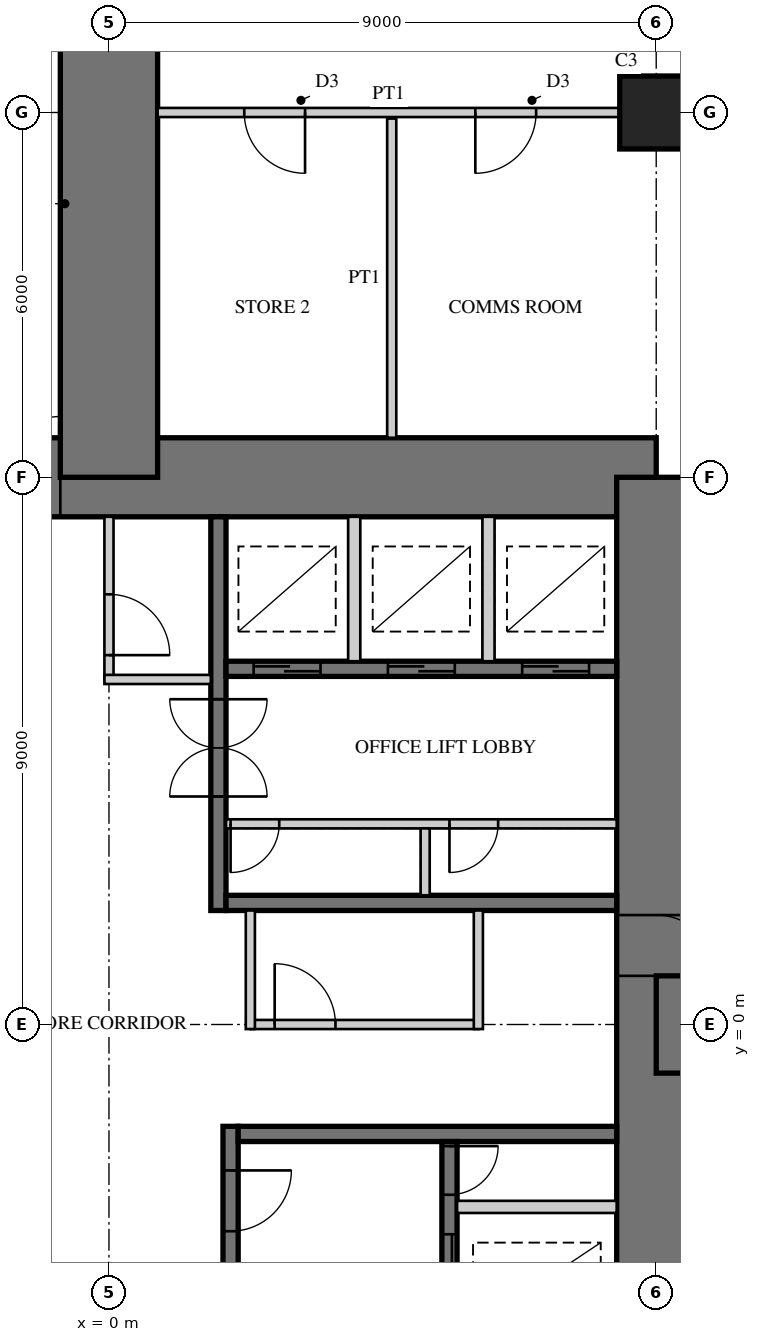
"""IFC4 building model, lengths in metres.
Left out: names, types, materials, properties, quantities, classifications, styles, units other than length and angle.
Written with IfcOpenShell. Run it as: python <this file> out.ifc"""

import sys

from ifc_helpers import new_model, si_unit, direction, frame, frame_2d, origin, origin_2d, place, context, subcontext, project, spatial, rectangle, extrude, element, fill, save


model = new_model("IFC4")
c1 = context("Model", 3, precision=1e-05, world=origin(), true_north=direction((0.0, 1.0)))
c2 = subcontext(c1, "Body", "Model", "MODEL_VIEW")
j1 = project(units=[si_unit("LENGTHUNIT", "METRE"), si_unit("PLANEANGLEUNIT", "RADIAN")], contexts=[c1])
p1 = place(None, origin())
s1 = spatial("IfcSite", under=j1, at=p1, CompositionType="ELEMENT")
p2 = place(p1, origin())
s2 = spatial("IfcBuilding", under=s1, at=p2, CompositionType="ELEMENT")
p3 = place(p2, frame((0.0, 0.0, 27.5)))
s3 = spatial("IfcBuildingStorey", under=s2, at=p3, CompositionType="ELEMENT", Elevation=27.5)
p4 = place(p3, frame((9.0, 9.0, 0.0), z_axis=(0.0, 0.0, 1.0), x_axis=(-1.0, 0.0, 0.0)))
e1 = element("IfcWall", 1, at=p4, inside=s3, PredefinedType="SHEAR", context=c2, shape_type="SweptSolid", body=[
    extrude(rectangle(XDim=18.0, YDim=1.3, at=frame_2d((9.0, 0.0))), origin(), (0.0, 0.0, 1.0), 4.0),
])
p5 = place(p4, frame((9.8, 0.0, 0.0)))
e2 = element("IfcOpeningElement", 2, at=p5, cuts=e1, PredefinedType="OPENING", context=c2, shape_type="SweptSolid", body=[
    extrude(rectangle(XDim=1.0, YDim=2.4, at=frame_2d((0.5, 1.2))), frame((0.0, 0.66, 0.0), z_axis=(0.0, -1.0, 0.0), x_axis=(1.0, 0.0, 0.0)), (0.0, 0.0, 1.0), 1.32),
])
p6 = place(p3, frame((9.0, -9.0, 0.0), z_axis=(0.0, 0.0, 1.0), x_axis=(0.0, 1.0, 0.0)))
e3 = element("IfcWall", 3, at=p6, inside=s3, PredefinedType="SHEAR", context=c2, shape_type="SweptSolid", body=[
    extrude(rectangle(XDim=18.0, YDim=1.3, at=frame_2d((9.0, 0.0))), origin(), (0.0, 0.0, 1.0), 4.0),
])
p7 = place(p6, frame((9.8, 0.0, 0.0)))
e4 = element("IfcOpeningElement", 4, at=p7, cuts=e3, PredefinedType="OPENING", context=c2, shape_type="SweptSolid", body=[
    extrude(rectangle(XDim=1.0, YDim=2.4, at=frame_2d((0.5, 1.2))), frame((0.0, 0.66, 0.0), z_axis=(0.0, -1.0, 0.0), x_axis=(1.0, 0.0, 0.0)), (0.0, 0.0, 1.0), 1.32),
])
p8 = place(p3, frame((1.8, 1.875, 0.0), z_axis=(0.0, 0.0, 1.0), x_axis=(0.0, 1.0, 0.0)))
e5 = element("IfcWall", 5, at=p8, inside=s3, PredefinedType="SHEAR", context=c2, shape_type="SweptSolid", body=[
    extrude(rectangle(XDim=6.475, YDim=0.25, at=frame_2d((3.238, 0.0))), origin(), (0.0, 0.0, 1.0), 4.0),
])
p9 = place(p8, frame((1.875, 0.0, 0.0)))
e6 = element("IfcOpeningElement", 6, at=p9, cuts=e5, PredefinedType="OPENING", context=c2, shape_type="SweptSolid", body=[
    extrude(rectangle(XDim=1.6, YDim=2.4, at=frame_2d((0.8, 1.2))), frame((0.0, 0.135, 0.0), z_axis=(0.0, -1.0, 0.0), x_axis=(1.0, 0.0, 0.0)), (0.0, 0.0, 1.0), 0.27),
])
p10 = place(p3, frame((1.925, 2.0, 0.0), z_axis=(0.0, 0.0, 1.0), x_axis=(1.0, 0.0, 0.0)))
e7 = element("IfcWall", 7, at=p10, inside=s3, PredefinedType="SHEAR", context=c2, shape_type="SweptSolid", body=[
    extrude(rectangle(XDim=6.425, YDim=0.25, at=frame_2d((3.212, 0.0))), origin(), (0.0, 0.0, 1.0), 4.0),
])
p11 = place(p3, frame((1.925, 5.85, 0.0), z_axis=(0.0, 0.0, 1.0), x_axis=(1.0, 0.0, 0.0)))
e8 = element("IfcWall", 8, at=p11, inside=s3, PredefinedType="SHEAR", context=c2, shape_type="SweptSolid", body=[
    extrude(rectangle(XDim=6.425, YDim=0.25, at=frame_2d((3.212, 0.0))), origin(), (0.0, 0.0, 1.0), 4.0),
])
p12 = place(p11, frame((0.454, 0.0, 0.0)))
e9 = element("IfcOpeningElement", 9, at=p12, cuts=e8, PredefinedType="OPENING", context=c2, shape_type="SweptSolid", body=[
    extrude(rectangle(XDim=1.1, YDim=2.2, at=frame_2d((0.55, 1.1))), frame((0.0, 0.135, 0.0), z_axis=(0.0, -1.0, 0.0), x_axis=(1.0, 0.0, 0.0)), (0.0, 0.0, 1.0), 0.27),
])
p13 = place(p11, frame((2.663, 0.0, 0.0)))
e10 = element("IfcOpeningElement", 10, at=p13, cuts=e8, PredefinedType="OPENING", context=c2, shape_type="SweptSolid", body=[
    extrude(rectangle(XDim=1.1, YDim=2.2, at=frame_2d((0.55, 1.1))), frame((0.0, 0.135, 0.0), z_axis=(0.0, -1.0, 0.0), x_axis=(1.0, 0.0, 0.0)), (0.0, 0.0, 1.0), 0.27),
])
p14 = place(p11, frame((4.871, 0.0, 0.0)))
e11 = element("IfcOpeningElement", 11, at=p14, cuts=e8, PredefinedType="OPENING", context=c2, shape_type="SweptSolid", body=[
    extrude(rectangle(XDim=1.1, YDim=2.2, at=frame_2d((0.55, 1.1))), frame((0.0, 0.135, 0.0), z_axis=(0.0, -1.0, 0.0), x_axis=(1.0, 0.0, 0.0)), (0.0, 0.0, 1.0), 0.27),
])
p15 = place(p3, frame((1.925, 3.3, 0.0), z_axis=(0.0, 0.0, 1.0), x_axis=(1.0, 0.0, 0.0)))
e12 = element("IfcWall", 12, at=p15, inside=s3, PredefinedType="PARTITIONING", context=c2, shape_type="SweptSolid", body=[
    extrude(rectangle(XDim=6.425, YDim=0.15, at=frame_2d((3.212, 0.0))), origin(), (0.0, 0.0, 1.0), 4.0),
])
p16 = place(p15, frame((0.075, 0.0, 0.0)))
e13 = element("IfcOpeningElement", 13, at=p16, cuts=e12, PredefinedType="OPENING", context=c2, shape_type="SweptSolid", body=[
    extrude(rectangle(XDim=0.8, YDim=2.1, at=frame_2d((0.4, 1.05))), frame((0.0, 0.085, 0.0), z_axis=(0.0, -1.0, 0.0), x_axis=(1.0, 0.0, 0.0)), (0.0, 0.0, 1.0), 0.17),
])
p17 = place(p15, frame((3.675, 0.0, 0.0)))
e14 = element("IfcOpeningElement", 14, at=p17, cuts=e12, PredefinedType="OPENING", context=c2, shape_type="SweptSolid", body=[
    extrude(rectangle(XDim=0.8, YDim=2.1, at=frame_2d((0.4, 1.05))), frame((0.0, 0.085, 0.0), z_axis=(0.0, -1.0, 0.0), x_axis=(1.0, 0.0, 0.0)), (0.0, 0.0, 1.0), 0.17),
])
p18 = place(p3, frame((5.2, 2.125, 0.0), z_axis=(0.0, 0.0, 1.0), x_axis=(0.0, 1.0, 0.0)))
e15 = element("IfcWall", 15, at=p18, inside=s3, PredefinedType="PARTITIONING", context=c2, shape_type="SweptSolid", body=[
    extrude(rectangle(XDim=1.1, YDim=0.15, at=frame_2d((0.55, 0.0))), origin(), (0.0, 0.0, 1.0), 4.0),
])
for number, where, z_axis, x_axis in (
    (16, (4.033, 5.975, 0.0), (0.0, 0.0, 1.0), (0.0, 1.0, 0.0)),
    (17, (6.242, 5.975, 0.0), (0.0, 0.0, 1.0), (0.0, 1.0, 0.0)),
):
    element("IfcWall", number, at=place(p3, frame(where, z_axis=z_axis, x_axis=x_axis)), inside=s3, PredefinedType="PARTITIONING", context=c2, shape_type="SweptSolid", body=[
        extrude(rectangle(XDim=2.375, YDim=0.2, at=frame_2d((1.188, 0.0))), origin(), (0.0, 0.0, 1.0), 4.0),
    ])
p19 = place(p3, frame((2.0, -1.675, 0.0), z_axis=(0.0, 0.0, 1.0), x_axis=(0.0, -1.0, 0.0)))
e18 = element("IfcWall", 18, at=p19, inside=s3, PredefinedType="SHEAR", context=c2, shape_type="SweptSolid", body=[
    extrude(rectangle(XDim=6.675, YDim=0.25, at=frame_2d((3.337, 0.0))), origin(), (0.0, 0.0, 1.0), 4.0),
])
p20 = place(p19, frame((0.725, 0.0, 0.0)))
e19 = element("IfcOpeningElement", 19, at=p20, cuts=e18, PredefinedType="OPENING", context=c2, shape_type="SweptSolid", body=[
    extrude(rectangle(XDim=1.0, YDim=2.1, at=frame_2d((0.5, 1.05))), frame((0.0, 0.135, 0.0), z_axis=(0.0, -1.0, 0.0), x_axis=(1.0, 0.0, 0.0)), (0.0, 0.0, 1.0), 0.27),
])
p21 = place(p3, frame((2.125, -1.8, 0.0), z_axis=(0.0, 0.0, 1.0), x_axis=(1.0, 0.0, 0.0)))
e20 = element("IfcWall", 20, at=p21, inside=s3, PredefinedType="SHEAR", context=c2, shape_type="SweptSolid", body=[
    extrude(rectangle(XDim=6.225, YDim=0.25, at=frame_2d((3.113, 0.0))), origin(), (0.0, 0.0, 1.0), 4.0),
])
p22 = place(p3, frame((5.6, -1.925, 0.0), z_axis=(0.0, 0.0, 1.0), x_axis=(0.0, -1.0, 0.0)))
e21 = element("IfcWall", 21, at=p22, inside=s3, PredefinedType="SHEAR", context=c2, shape_type="SweptSolid", body=[
    extrude(rectangle(XDim=3.55, YDim=0.25, at=frame_2d((1.775, 0.0))), origin(), (0.0, 0.0, 1.0), 4.0),
])
p23 = place(p22, frame((1.525, 0.0, 0.0)))
e22 = element("IfcOpeningElement", 22, at=p23, cuts=e21, PredefinedType="OPENING", context=c2, shape_type="SweptSolid", body=[
    extrude(rectangle(XDim=1.1, YDim=2.2, at=frame_2d((0.55, 1.1))), frame((0.0, 0.135, 0.0), z_axis=(0.0, -1.0, 0.0), x_axis=(1.0, 0.0, 0.0)), (0.0, 0.0, 1.0), 0.27),
])
p24 = place(p22, frame((0.075, 0.0, 0.0)))
e23 = element("IfcOpeningElement", 23, at=p24, cuts=e21, PredefinedType="OPENING", context=c2, shape_type="SweptSolid", body=[
    extrude(rectangle(XDim=0.8, YDim=2.1, at=frame_2d((0.4, 1.05))), frame((0.0, 0.135, 0.0), z_axis=(0.0, -1.0, 0.0), x_axis=(1.0, 0.0, 0.0)), (0.0, 0.0, 1.0), 0.27),
])
p25 = place(p3, frame((5.725, -3.0, 0.0), z_axis=(0.0, 0.0, 1.0), x_axis=(1.0, 0.0, 0.0)))
e24 = element("IfcWall", 24, at=p25, inside=s3, PredefinedType="PARTITIONING", context=c2, shape_type="SweptSolid", body=[
    extrude(rectangle(XDim=2.625, YDim=0.2, at=frame_2d((1.312, 0.0))), origin(), (0.0, 0.0, 1.0), 4.0),
])
p26 = place(p3, frame((0.0, 9.0, 0.0), z_axis=(0.0, 0.0, 1.0), x_axis=(0.0, 1.0, 0.0)))
e25 = element("IfcWall", 25, at=p26, inside=s3, PredefinedType="SHEAR", context=c2, shape_type="SweptSolid", body=[
    extrude(rectangle(XDim=9.0, YDim=1.6, at=frame_2d((4.5, 0.0))), origin(), (0.0, 0.0, 1.0), 4.0),
])
p27 = place(p3, frame((9.0, 0.0, 0.0), z_axis=(0.0, 0.0, 1.0), x_axis=(1.0, 0.0, 0.0)))
e26 = element("IfcWall", 26, at=p27, inside=s3, PredefinedType="SHEAR", context=c2, shape_type="SweptSolid", body=[
    extrude(rectangle(XDim=18.0, YDim=1.6, at=frame_2d((9.0, 0.0))), origin(), (0.0, 0.0, 1.0), 4.0),
])
p28 = place(p27, frame((9.9, 0.0, 0.0)))
e27 = element("IfcOpeningElement", 27, at=p28, cuts=e26, PredefinedType="OPENING", context=c2, shape_type="SweptSolid", body=[
    extrude(rectangle(XDim=1.0, YDim=2.2, at=frame_2d((0.5, 1.1))), frame((0.0, 0.81, 0.0), z_axis=(0.0, -1.0, 0.0), x_axis=(1.0, 0.0, 0.0)), (0.0, 0.0, 1.0), 1.62),
])
p29 = place(p3, frame((9.0, 15.0, 0.0), z_axis=(0.0, 0.0, 1.0), x_axis=(1.0, 0.0, 0.0)))
e28 = element("IfcColumn", 28, at=p29, inside=s3, PredefinedType="COLUMN", context=c2, shape_type="SweptSolid", body=[
    extrude(rectangle(XDim=1.2, YDim=1.2, at=origin_2d()), origin(), (0.0, 0.0, 1.0), 4.0),
])
p30 = place(p3, frame((2.325, 0.0, 0.0), z_axis=(0.0, 0.0, 1.0), x_axis=(1.0, 0.0, 0.0)))
e29 = element("IfcWall", 29, at=p30, inside=s3, PredefinedType="PARTITIONING", context=c2, shape_type="SweptSolid", body=[
    extrude(rectangle(XDim=3.75, YDim=0.15, at=frame_2d((1.875, 0.0))), origin(), (0.0, 0.0, 1.0), 3.8),
])
p31 = place(p30, frame((0.4, 0.0, 0.0)))
e30 = element("IfcOpeningElement", 30, at=p31, cuts=e29, PredefinedType="OPENING", context=c2, shape_type="SweptSolid", body=[
    extrude(rectangle(XDim=1.0, YDim=2.1, at=frame_2d((0.5, 1.05))), frame((0.0, 0.085, 0.0), z_axis=(0.0, -1.0, 0.0), x_axis=(1.0, 0.0, 0.0)), (0.0, 0.0, 1.0), 0.17),
])
for number, where, z_axis, x_axis in (
    (31, (2.325, 1.875, 0.0), (0.0, 0.0, 1.0), (0.0, -1.0, 0.0)),
    (32, (6.075, -0.075, 0.0), (0.0, 0.0, 1.0), (0.0, 1.0, 0.0)),
):
    element("IfcWall", number, at=place(p3, frame(where, z_axis=z_axis, x_axis=x_axis)), inside=s3, PredefinedType="PARTITIONING", context=c2, shape_type="SweptSolid", body=[
        extrude(rectangle(XDim=1.95, YDim=0.15, at=frame_2d((0.975, 0.0))), origin(), (0.0, 0.0, 1.0), 3.8),
    ])
p32 = place(p3, frame((0.0, 5.675, 0.0), z_axis=(0.0, 0.0, 1.0), x_axis=(0.0, 1.0, 0.0)))
e33 = element("IfcWall", 33, at=p32, inside=s3, PredefinedType="PARTITIONING", context=c2, shape_type="SweptSolid", body=[
    extrude(rectangle(XDim=2.675, YDim=0.15, at=frame_2d((1.337, 0.0))), origin(), (0.0, 0.0, 1.0), 3.8),
])
p33 = place(p32, frame((0.4, 0.0, 0.0)))
e34 = element("IfcOpeningElement", 34, at=p33, cuts=e33, PredefinedType="OPENING", context=c2, shape_type="SweptSolid", body=[
    extrude(rectangle(XDim=1.0, YDim=2.1, at=frame_2d((0.5, 1.05))), frame((0.0, 0.085, 0.0), z_axis=(0.0, -1.0, 0.0), x_axis=(1.0, 0.0, 0.0)), (0.0, 0.0, 1.0), 0.17),
])
p34 = place(p3, frame((1.675, 5.675, 0.0), z_axis=(0.0, 0.0, 1.0), x_axis=(-1.0, 0.0, 0.0)))
e35 = element("IfcWall", 35, at=p34, inside=s3, PredefinedType="PARTITIONING", context=c2, shape_type="SweptSolid", body=[
    extrude(rectangle(XDim=1.75, YDim=0.15, at=frame_2d((0.875, 0.0))), origin(), (0.0, 0.0, 1.0), 3.8),
])
p35 = place(p3, frame((8.4, 15.0, 0.0), z_axis=(0.0, 0.0, 1.0), x_axis=(-1.0, 0.0, 0.0)))
e36 = element("IfcWall", 36, at=p35, inside=s3, PredefinedType="PARTITIONING", context=c2, shape_type="SweptSolid", body=[
    extrude(rectangle(XDim=7.6, YDim=0.15, at=frame_2d((3.8, 0.0))), origin(), (0.0, 0.0, 1.0), 2.95),
])
p36 = place(p35, frame((1.375, 0.0, 0.0)))
e37 = element("IfcOpeningElement", 37, at=p36, cuts=e36, PredefinedType="OPENING", context=c2, shape_type="SweptSolid", body=[
    extrude(rectangle(XDim=1.0, YDim=2.1, at=frame_2d((0.5, 1.05))), frame((0.0, 0.085, 0.0), z_axis=(0.0, -1.0, 0.0), x_axis=(1.0, 0.0, 0.0)), (0.0, 0.0, 1.0), 0.17),
])
p37 = place(p35, frame((5.175, 0.0, 0.0)))
e38 = element("IfcOpeningElement", 38, at=p37, cuts=e36, PredefinedType="OPENING", context=c2, shape_type="SweptSolid", body=[
    extrude(rectangle(XDim=1.0, YDim=2.1, at=frame_2d((0.5, 1.05))), frame((0.0, 0.085, 0.0), z_axis=(0.0, -1.0, 0.0), x_axis=(1.0, 0.0, 0.0)), (0.0, 0.0, 1.0), 0.17),
])
p38 = place(p3, frame((4.65, 9.65, 0.0), z_axis=(0.0, 0.0, 1.0), x_axis=(0.0, 1.0, 0.0)))
e39 = element("IfcWall", 39, at=p38, inside=s3, PredefinedType="PARTITIONING", context=c2, shape_type="SweptSolid", body=[
    extrude(rectangle(XDim=5.25, YDim=0.15, at=frame_2d((2.625, 0.0))), origin(), (0.0, 0.0, 1.0), 3.8),
])
p39 = place(p31, origin())
e40 = element("IfcDoor", 40, at=p39, inside=s3, OperationType="SINGLE_SWING_LEFT", PredefinedType="DOOR", context=c2, shape_type="SweptSolid", body=[
    extrude(rectangle(XDim=1.0, YDim=2.1, at=frame_2d((0.5, 1.05))), frame((0.0, 0.025, 0.0), z_axis=(0.0, -1.0, 0.0), x_axis=(1.0, 0.0, 0.0)), (0.0, 0.0, 1.0), 0.05),
])
fill(e30, e40)
p40 = place(p33, frame((1.0, 0.0, 0.0), z_axis=(0.0, 0.0, 1.0), x_axis=(-1.0, 0.0, 0.0)))
e41 = element("IfcDoor", 41, at=p40, inside=s3, OperationType="SINGLE_SWING_RIGHT", PredefinedType="DOOR", context=c2, shape_type="SweptSolid", body=[
    extrude(rectangle(XDim=1.0, YDim=2.1, at=frame_2d((0.5, 1.05))), frame((0.0, 0.025, 0.0), z_axis=(0.0, -1.0, 0.0), x_axis=(1.0, 0.0, 0.0)), (0.0, 0.0, 1.0), 0.05),
])
fill(e34, e41)
p41 = place(p36, origin())
e42 = element("IfcDoor", 42, at=p41, inside=s3, OperationType="SINGLE_SWING_RIGHT", PredefinedType="DOOR", context=c2, shape_type="SweptSolid", body=[
    extrude(rectangle(XDim=1.0, YDim=2.1, at=frame_2d((0.5, 1.05))), frame((0.0, 0.025, 0.0), z_axis=(0.0, -1.0, 0.0), x_axis=(1.0, 0.0, 0.0)), (0.0, 0.0, 1.0), 0.05),
])
fill(e37, e42)
p42 = place(p37, origin())
e43 = element("IfcDoor", 43, at=p42, inside=s3, OperationType="SINGLE_SWING_LEFT", PredefinedType="DOOR", context=c2, shape_type="SweptSolid", body=[
    extrude(rectangle(XDim=1.0, YDim=2.1, at=frame_2d((0.5, 1.05))), frame((0.0, 0.025, 0.0), z_axis=(0.0, -1.0, 0.0), x_axis=(1.0, 0.0, 0.0)), (0.0, 0.0, 1.0), 0.05),
])
fill(e38, e43)
p43 = place(p5, frame((1.0, 0.0, 0.0), z_axis=(0.0, 0.0, 1.0), x_axis=(-1.0, 0.0, 0.0)))
e44 = element("IfcDoor", 44, at=p43, inside=s3, OperationType="SINGLE_SWING_RIGHT", PredefinedType="DOOR", context=c2, shape_type="SweptSolid", body=[
    extrude(rectangle(XDim=1.0, YDim=2.4, at=frame_2d((0.5, 1.2))), frame((0.0, -0.005, 0.0), z_axis=(0.0, -1.0, 0.0), x_axis=(1.0, 0.0, 0.0)), (0.0, 0.0, 1.0), 0.05),
])
fill(e2, e44)
p44 = place(p7, frame((1.0, 0.0, 0.0), z_axis=(0.0, 0.0, 1.0), x_axis=(-1.0, 0.0, 0.0)))
e45 = element("IfcDoor", 45, at=p44, inside=s3, OperationType="SINGLE_SWING_RIGHT", PredefinedType="DOOR", context=c2, shape_type="SweptSolid", body=[
    extrude(rectangle(XDim=1.0, YDim=2.4, at=frame_2d((0.5, 1.2))), frame((0.0, -0.005, 0.0), z_axis=(0.0, -1.0, 0.0), x_axis=(1.0, 0.0, 0.0)), (0.0, 0.0, 1.0), 0.05),
])
fill(e4, e45)
p45 = place(p12, origin())
e46 = element("IfcDoor", 46, at=p45, inside=s3, OperationType="DOUBLE_DOOR_SLIDING", PredefinedType="DOOR", context=c2, shape_type="SweptSolid", body=[
    extrude(rectangle(XDim=1.1, YDim=2.2, at=frame_2d((0.55, 1.1))), frame((0.0, 0.025, 0.0), z_axis=(0.0, -1.0, 0.0), x_axis=(1.0, 0.0, 0.0)), (0.0, 0.0, 1.0), 0.05),
])
fill(e9, e46)
p46 = place(p13, origin())
e47 = element("IfcDoor", 47, at=p46, inside=s3, OperationType="DOUBLE_DOOR_SLIDING", PredefinedType="DOOR", context=c2, shape_type="SweptSolid", body=[
    extrude(rectangle(XDim=1.1, YDim=2.2, at=frame_2d((0.55, 1.1))), frame((0.0, 0.025, 0.0), z_axis=(0.0, -1.0, 0.0), x_axis=(1.0, 0.0, 0.0)), (0.0, 0.0, 1.0), 0.05),
])
fill(e10, e47)
p47 = place(p14, origin())
e48 = element("IfcDoor", 48, at=p47, inside=s3, OperationType="DOUBLE_DOOR_SLIDING", PredefinedType="DOOR", context=c2, shape_type="SweptSolid", body=[
    extrude(rectangle(XDim=1.1, YDim=2.2, at=frame_2d((0.55, 1.1))), frame((0.0, 0.025, 0.0), z_axis=(0.0, -1.0, 0.0), x_axis=(1.0, 0.0, 0.0)), (0.0, 0.0, 1.0), 0.05),
])
fill(e11, e48)
p48 = place(p9, origin())
e49 = element("IfcDoor", 49, at=p48, inside=s3, OperationType="DOUBLE_DOOR_DOUBLE_SWING", PredefinedType="DOOR", context=c2, shape_type="SweptSolid", body=[
    extrude(rectangle(XDim=1.6, YDim=2.4, at=frame_2d((0.8, 1.2))), frame((0.0, 0.025, 0.0), z_axis=(0.0, -1.0, 0.0), x_axis=(1.0, 0.0, 0.0)), (0.0, 0.0, 1.0), 0.05),
])
fill(e6, e49)
p49 = place(p16, frame((0.8, 0.0, 0.0), z_axis=(0.0, 0.0, 1.0), x_axis=(-1.0, 0.0, 0.0)))
e50 = element("IfcDoor", 50, at=p49, inside=s3, OperationType="SINGLE_SWING_RIGHT", PredefinedType="DOOR", context=c2, shape_type="SweptSolid", body=[
    extrude(rectangle(XDim=0.8, YDim=2.1, at=frame_2d((0.4, 1.05))), frame((0.0, 0.025, 0.0), z_axis=(0.0, -1.0, 0.0), x_axis=(1.0, 0.0, 0.0)), (0.0, 0.0, 1.0), 0.05),
])
fill(e13, e50)
p50 = place(p17, frame((0.8, 0.0, 0.0), z_axis=(0.0, 0.0, 1.0), x_axis=(-1.0, 0.0, 0.0)))
e51 = element("IfcDoor", 51, at=p50, inside=s3, OperationType="SINGLE_SWING_RIGHT", PredefinedType="DOOR", context=c2, shape_type="SweptSolid", body=[
    extrude(rectangle(XDim=0.8, YDim=2.1, at=frame_2d((0.4, 1.05))), frame((0.0, 0.025, 0.0), z_axis=(0.0, -1.0, 0.0), x_axis=(1.0, 0.0, 0.0)), (0.0, 0.0, 1.0), 0.05),
])
fill(e14, e51)
p51 = place(p20, origin())
e52 = element("IfcDoor", 52, at=p51, inside=s3, OperationType="SINGLE_SWING_LEFT", PredefinedType="DOOR", context=c2, shape_type="SweptSolid", body=[
    extrude(rectangle(XDim=1.0, YDim=2.1, at=frame_2d((0.5, 1.05))), frame((0.0, 0.025, 0.0), z_axis=(0.0, -1.0, 0.0), x_axis=(1.0, 0.0, 0.0)), (0.0, 0.0, 1.0), 0.05),
])
fill(e19, e52)
p52 = place(p23, origin())
e53 = element("IfcDoor", 53, at=p52, inside=s3, OperationType="DOUBLE_DOOR_SLIDING", PredefinedType="DOOR", context=c2, shape_type="SweptSolid", body=[
    extrude(rectangle(XDim=1.1, YDim=2.2, at=frame_2d((0.55, 1.1))), frame((0.0, 0.025, 0.0), z_axis=(0.0, -1.0, 0.0), x_axis=(1.0, 0.0, 0.0)), (0.0, 0.0, 1.0), 0.05),
])
fill(e22, e53)
p53 = place(p24, origin())
e54 = element("IfcDoor", 54, at=p53, inside=s3, OperationType="SINGLE_SWING_LEFT", PredefinedType="DOOR", context=c2, shape_type="SweptSolid", body=[
    extrude(rectangle(XDim=0.8, YDim=2.1, at=frame_2d((0.4, 1.05))), frame((0.0, 0.025, 0.0), z_axis=(0.0, -1.0, 0.0), x_axis=(1.0, 0.0, 0.0)), (0.0, 0.0, 1.0), 0.05),
])
fill(e23, e54)
save(model, sys.argv[1])
